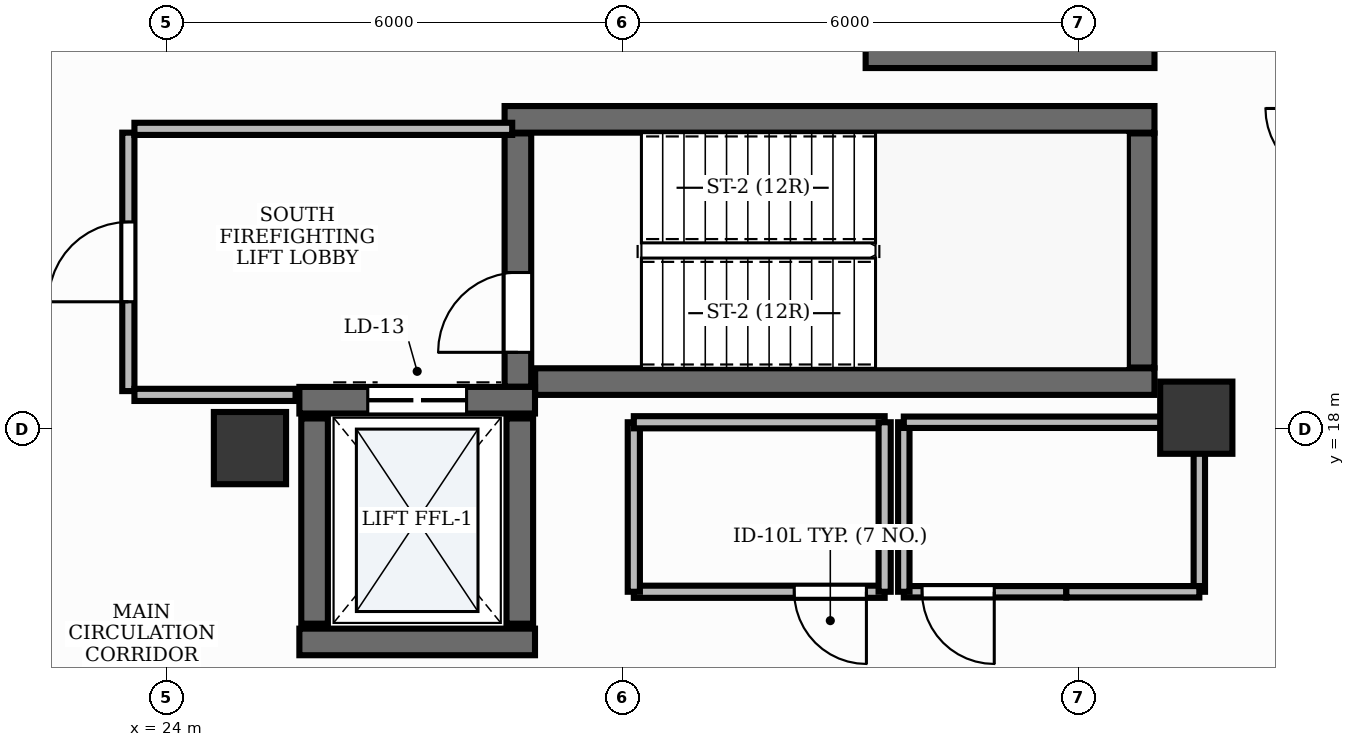
"""IFC4 building model, lengths in metres.
Left out: names, types, materials, properties, quantities, classifications, styles, units other than length and angle.
Written with IfcOpenShell. Run it as: python <this file> out.ifc"""

import sys

from ifc_helpers import new_model, si_unit, direction, frame, frame_2d, origin, origin_2d, place, context, subcontext, project, spatial, rectangle, extrude, element, fill, save


model = new_model("IFC4")
c1 = context("Model", 3, precision=1e-05, world=origin(), true_north=direction((0.0, 1.0)))
c2 = subcontext(c1, "Body", "Model", "MODEL_VIEW")
j1 = project(units=[si_unit("LENGTHUNIT", "METRE"), si_unit("PLANEANGLEUNIT", "RADIAN")], contexts=[c1])
p1 = place(None, origin())
s1 = spatial("IfcSite", under=j1, at=p1, CompositionType="ELEMENT")
p2 = place(p1, origin())
s2 = spatial("IfcBuilding", under=s1, at=p2, CompositionType="ELEMENT")
p3 = place(p2, frame((0.0, 0.0, 286.8)))
s3 = spatial("IfcBuildingStorey", under=s2, at=p3, CompositionType="ELEMENT", Elevation=286.8)
p4 = place(p3, frame((28.852, 18.625, 0.0), z_axis=(0.0, 0.0, 1.0), x_axis=(1.0, 0.0, 0.0)))
e1 = element("IfcWall", 1, at=p4, inside=s3, PredefinedType="SHEAR", context=c2, shape_type="SweptSolid", body=[
    extrude(rectangle(XDim=8.148, YDim=0.35, at=frame_2d((4.074, 0.0))), origin(), (0.0, 0.0, 1.0), 3.9),
])
p5 = place(p3, frame((28.45, 22.075, 0.0), z_axis=(0.0, 0.0, 1.0), x_axis=(1.0, 0.0, 0.0)))
e2 = element("IfcWall", 2, at=p5, inside=s3, PredefinedType="SHEAR", context=c2, shape_type="SweptSolid", body=[
    extrude(rectangle(XDim=8.55, YDim=0.35, at=frame_2d((4.275, 0.0))), origin(), (0.0, 0.0, 1.0), 3.9),
])
p6 = place(p3, frame((36.825, 18.81, 0.0), z_axis=(0.0, 0.0, 1.0), x_axis=(0.0, 1.0, 0.0)))
e3 = element("IfcWall", 3, at=p6, inside=s3, PredefinedType="SHEAR", context=c2, shape_type="SweptSolid", body=[
    extrude(rectangle(XDim=3.08, YDim=0.35, at=frame_2d((1.54, 0.0))), origin(), (0.0, 0.0, 1.0), 3.9),
])
p7 = place(p3, frame((28.625, 18.557, 0.0), z_axis=(0.0, 0.0, 1.0), x_axis=(0.0, 1.0, 0.0)))
e4 = element("IfcWall", 4, at=p7, inside=s3, PredefinedType="SHEAR", context=c2, shape_type="SweptSolid", body=[
    extrude(rectangle(XDim=3.333, YDim=0.35, at=frame_2d((1.667, 0.0))), origin(), (0.0, 0.0, 1.0), 3.9),
])
p8 = place(p7, frame((0.453, 0.0, 0.0)))
e5 = element("IfcOpeningElement", 5, at=p8, cuts=e4, PredefinedType="OPENING", context=c2, shape_type="SweptSolid", body=[
    extrude(rectangle(XDim=1.05, YDim=2.15, at=frame_2d((0.525, 1.075))), frame((0.0, 0.19, 0.0), z_axis=(0.0, -1.0, 0.0), x_axis=(1.0, 0.0, 0.0)), (0.0, 0.0, 1.0), 0.38),
])
p9 = place(p3, frame((33.2, 22.925, 0.0), z_axis=(0.0, 0.0, 1.0), x_axis=(1.0, 0.0, 0.0)))
e6 = element("IfcWall", 6, at=p9, inside=s3, PredefinedType="SHEAR", context=c2, shape_type="SweptSolid", body=[
    extrude(rectangle(XDim=3.8, YDim=0.35, at=frame_2d((1.9, 0.0))), origin(), (0.0, 0.0, 1.0), 3.9),
])
p10 = place(p3, frame((25.75, 15.2, 0.0), z_axis=(0.0, 0.0, 1.0), x_axis=(1.0, 0.0, 0.0)))
e7 = element("IfcWall", 7, at=p10, inside=s3, PredefinedType="SHEAR", context=c2, shape_type="SweptSolid", body=[
    extrude(rectangle(XDim=3.1, YDim=0.35, at=frame_2d((1.55, 0.0))), origin(), (0.0, 0.0, 1.0), 3.9),
])
p11 = place(p3, frame((25.75, 18.38, 0.0), z_axis=(0.0, 0.0, 1.0), x_axis=(1.0, 0.0, 0.0)))
e8 = element("IfcWall", 8, at=p11, inside=s3, PredefinedType="SHEAR", context=c2, shape_type="SweptSolid", body=[
    extrude(rectangle(XDim=3.1, YDim=0.35, at=frame_2d((1.55, 0.0))), origin(), (0.0, 0.0, 1.0), 3.9),
])
p12 = place(p11, frame((0.9, 0.0, 0.0)))
e9 = element("IfcOpeningElement", 9, at=p12, cuts=e8, PredefinedType="OPENING", context=c2, shape_type="SweptSolid", body=[
    extrude(rectangle(XDim=1.3, YDim=2.2, at=frame_2d((0.65, 1.1))), frame((0.0, 0.19, 0.0), z_axis=(0.0, -1.0, 0.0), x_axis=(1.0, 0.0, 0.0)), (0.0, 0.0, 1.0), 0.38),
])
for number, where, z_axis, x_axis in (
    (10, (25.95, 15.44, 0.0), (0.0, 0.0, 1.0), (0.0, 1.0, 0.0)),
    (11, (28.65, 15.44, 0.0), (0.0, 0.0, 1.0), (0.0, 1.0, 0.0)),
):
    element("IfcWall", number, at=place(p3, frame(where, z_axis=z_axis, x_axis=x_axis)), inside=s3, PredefinedType="SHEAR", context=c2, shape_type="SweptSolid", body=[
        extrude(rectangle(XDim=2.7, YDim=0.35, at=frame_2d((1.35, 0.0))), origin(), (0.0, 0.0, 1.0), 3.9),
    ])
for number, where, z_axis, x_axis in (
    (12, (25.1, 17.75, -0.0), (0.0, 0.0, 1.0), (1.0, 0.0, 0.0)),
    (13, (37.55, 18.15, -0.0), (0.0, 0.0, 1.0), (1.0, 0.0, 0.0)),
):
    element("IfcColumn", number, at=place(p3, frame(where, z_axis=z_axis, x_axis=x_axis)), inside=s3, PredefinedType="PILASTER", context=c2, shape_type="SweptSolid", body=[
        extrude(rectangle(XDim=0.95, YDim=0.95, at=origin_2d()), origin(), (0.0, 0.0, 1.0), 3.901),
    ])
p13 = place(p3, frame((23.5, 18.5, 0.0), z_axis=(0.0, 0.0, 1.0), x_axis=(0.0, 1.0, 0.0)))
e14 = element("IfcWall", 14, at=p13, inside=s3, PredefinedType="PARTITIONING", context=c2, shape_type="SweptSolid", body=[
    extrude(rectangle(XDim=3.4, YDim=0.16, at=frame_2d((1.7, 0.0))), origin(), (0.0, 0.0, 1.0), 2.22),
])
p14 = place(p13, frame((1.175, 0.0, 0.0)))
e15 = element("IfcOpeningElement", 15, at=p14, cuts=e14, PredefinedType="OPENING", context=c2, shape_type="SweptSolid", body=[
    extrude(rectangle(XDim=1.05, YDim=2.15, at=frame_2d((0.525, 1.075))), frame((0.0, 0.095, 0.0), z_axis=(0.0, -1.0, 0.0), x_axis=(1.0, 0.0, 0.0)), (0.0, 0.0, 1.0), 0.19),
])
p15 = place(p3, frame((23.58, 21.95, 0.0), z_axis=(0.0, 0.0, 1.0), x_axis=(1.0, 0.0, 0.0)))
e16 = element("IfcWall", 16, at=p15, inside=s3, PredefinedType="PARTITIONING", context=c2, shape_type="SweptSolid", body=[
    extrude(rectangle(XDim=4.97, YDim=0.16, at=frame_2d((2.485, 0.0))), origin(), (0.0, 0.0, 1.0), 2.22),
])
p16 = place(p3, frame((23.58, 18.45, 0.0), z_axis=(0.0, 0.0, 1.0), x_axis=(1.0, 0.0, 0.0)))
e17 = element("IfcWall", 17, at=p16, inside=s3, PredefinedType="PARTITIONING", context=c2, shape_type="SweptSolid", body=[
    extrude(rectangle(XDim=2.12, YDim=0.16, at=frame_2d((1.06, 0.0))), origin(), (0.0, 0.0, 1.0), 2.22),
])
p17 = place(p3, frame((33.45, 15.86, 0.0), z_axis=(0.0, 0.0, 1.0), x_axis=(-1.0, 0.0, 0.0)))
e18 = element("IfcWall", 18, at=p17, inside=s3, PredefinedType="PARTITIONING", context=c2, shape_type="SweptSolid", body=[
    extrude(rectangle(XDim=3.3, YDim=0.16, at=frame_2d((1.65, 0.0))), origin(), (0.0, 0.0, 1.0), 2.22),
])
p18 = place(p17, frame((0.24, 0.0, 0.0)))
e19 = element("IfcOpeningElement", 19, at=p18, cuts=e18, PredefinedType="OPENING", context=c2, shape_type="SweptSolid", body=[
    extrude(rectangle(XDim=0.95, YDim=2.15, at=frame_2d((0.475, 1.075))), frame((0.0, 0.095, 0.0), z_axis=(0.0, -1.0, 0.0), x_axis=(1.0, 0.0, 0.0)), (0.0, 0.0, 1.0), 0.19),
])
p19 = place(p3, frame((35.84, 15.86, 0.0), z_axis=(0.0, 0.0, 1.0), x_axis=(-1.0, 0.0, 0.0)))
e20 = element("IfcWall", 20, at=p19, inside=s3, PredefinedType="PARTITIONING", context=c2, shape_type="SweptSolid", body=[
    extrude(rectangle(XDim=2.138, YDim=0.15, at=frame_2d((1.069, 0.0))), origin(), (0.0, 0.0, 1.0), 2.22),
])
p20 = place(p19, frame((0.948, 0.0, 0.0)))
e21 = element("IfcOpeningElement", 21, at=p20, cuts=e20, PredefinedType="OPENING", context=c2, shape_type="SweptSolid", body=[
    extrude(rectangle(XDim=0.95, YDim=2.15, at=frame_2d((0.475, 1.075))), frame((0.0, 0.09, 0.0), z_axis=(0.0, -1.0, 0.0), x_axis=(1.0, 0.0, 0.0)), (0.0, 0.0, 1.0), 0.18),
])
p21 = place(p3, frame((30.15, 15.86, 0.0), z_axis=(0.0, 0.0, 1.0), x_axis=(0.0, 1.0, 0.0)))
e22 = element("IfcWall", 22, at=p21, inside=s3, PredefinedType="PARTITIONING", context=c2, shape_type="SweptSolid", body=[
    extrude(rectangle(XDim=2.23, YDim=0.16, at=frame_2d((1.115, 0.0))), origin(), (0.0, 0.0, 1.0), 2.22),
])
p22 = place(p3, frame((30.15, 18.09, 0.0), z_axis=(0.0, 0.0, 1.0), x_axis=(1.0, 0.0, 0.0)))
e23 = element("IfcWall", 23, at=p22, inside=s3, PredefinedType="PARTITIONING", context=c2, shape_type="SweptSolid", body=[
    extrude(rectangle(XDim=3.3, YDim=0.16, at=frame_2d((1.65, 0.0))), origin(), (0.0, 0.0, 1.0), 2.22),
])
p23 = place(p3, frame((33.45, 18.09, 0.0), z_axis=(0.0, 0.0, 1.0), x_axis=(0.0, -1.0, 0.0)))
e24 = element("IfcWall", 24, at=p23, inside=s3, PredefinedType="PARTITIONING", context=c2, shape_type="SweptSolid", body=[
    extrude(rectangle(XDim=2.23, YDim=0.16, at=frame_2d((1.115, 0.0))), origin(), (0.0, 0.0, 1.0), 2.22),
])
p24 = place(p3, frame((37.59, 18.058, 0.0), z_axis=(0.0, 0.0, 1.0), x_axis=(0.0, -1.0, 0.0)))
e25 = element("IfcWall", 25, at=p24, inside=s3, PredefinedType="PARTITIONING", context=c2, shape_type="SweptSolid", body=[
    extrude(rectangle(XDim=2.198, YDim=0.15, at=frame_2d((1.099, 0.0))), origin(), (0.0, 0.0, 1.0), 2.22),
])
p25 = place(p3, frame((37.59, 15.86, 0.0), z_axis=(0.0, 0.0, 1.0), x_axis=(-1.0, 0.0, 0.0)))
e26 = element("IfcWall", 26, at=p25, inside=s3, PredefinedType="PARTITIONING", context=c2, shape_type="SweptSolid", body=[
    extrude(rectangle(XDim=1.75, YDim=0.15, at=frame_2d((0.875, 0.0))), origin(), (0.0, 0.0, 1.0), 2.22),
])
p26 = place(p3, frame((33.702, 15.86, 0.0), z_axis=(0.0, 0.0, 1.0), x_axis=(0.0, 1.0, 0.0)))
e27 = element("IfcWall", 27, at=p26, inside=s3, PredefinedType="PARTITIONING", context=c2, shape_type="SweptSolid", body=[
    extrude(rectangle(XDim=2.23, YDim=0.15, at=frame_2d((1.115, 0.0))), origin(), (0.0, 0.0, 1.0), 2.22),
])
p27 = place(p3, frame((33.702, 18.09, 0.0), z_axis=(0.0, 0.0, 1.0), x_axis=(1.0, 0.0, 0.0)))
e28 = element("IfcWall", 28, at=p27, inside=s3, PredefinedType="PARTITIONING", context=c2, shape_type="SweptSolid", body=[
    extrude(rectangle(XDim=3.648, YDim=0.15, at=frame_2d((1.824, 0.0))), origin(), (0.0, 0.0, 1.0), 2.22),
])
p28 = place(p3, frame((37.36, 18.1, 0.0), z_axis=(0.0, 0.0, 1.0), x_axis=(0.0, 1.0, 0.0)))
e29 = element("IfcWall", 29, at=p28, inside=s3, PredefinedType="PARTITIONING", context=c2, shape_type="SweptSolid", body=[
    extrude(rectangle(XDim=0.126, YDim=0.15, at=frame_2d((0.063, 0.0))), origin(), (0.0, 0.0, 1.0), 2.22),
])
p29 = place(p3, frame((37.36, 18.353, 0.0), z_axis=(0.0, 0.0, 1.0), x_axis=(0.61525105599, -0.788331236285, 0.0)))
e30 = element("IfcWall", 30, at=p29, inside=s3, PredefinedType="PARTITIONING", context=c2, shape_type="SweptSolid", body=[
    extrude(rectangle(XDim=0.374, YDim=0.15, at=frame_2d((0.187, 0.0))), origin(), (0.0, 0.0, 1.0), 2.22),
])
p30 = place(p8, origin())
e31 = element("IfcDoor", 31, at=p30, inside=s3, OperationType="SINGLE_SWING_LEFT", PredefinedType="DOOR", context=c2, shape_type="SweptSolid", body=[
    extrude(rectangle(XDim=1.05, YDim=2.15, at=frame_2d((0.525, 1.075))), frame((0.0, 0.025, 0.0), z_axis=(0.0, -1.0, 0.0), x_axis=(1.0, 0.0, 0.0)), (0.0, 0.0, 1.0), 0.05),
])
fill(e5, e31)
p31 = place(p12, origin())
e32 = element("IfcDoor", 32, at=p31, inside=s3, OperationType="DOUBLE_DOOR_SLIDING", PredefinedType="DOOR", context=c2, shape_type="SweptSolid", body=[
    extrude(rectangle(XDim=1.3, YDim=2.2, at=frame_2d((0.65, 1.1))), frame((0.0, 0.025, 0.0), z_axis=(0.0, -1.0, 0.0), x_axis=(1.0, 0.0, 0.0)), (0.0, 0.0, 1.0), 0.05),
])
fill(e9, e32)
p32 = place(p14, origin())
e33 = element("IfcDoor", 33, at=p32, inside=s3, OperationType="SINGLE_SWING_LEFT", PredefinedType="DOOR", context=c2, shape_type="SweptSolid", body=[
    extrude(rectangle(XDim=1.05, YDim=2.15, at=frame_2d((0.525, 1.075))), frame((0.0, 0.025, 0.0), z_axis=(0.0, -1.0, 0.0), x_axis=(1.0, 0.0, 0.0)), (0.0, 0.0, 1.0), 0.05),
])
fill(e15, e33)
p33 = place(p18, origin())
e34 = element("IfcDoor", 34, at=p33, inside=s3, OperationType="SINGLE_SWING_LEFT", PredefinedType="DOOR", context=c2, shape_type="SweptSolid", body=[
    extrude(rectangle(XDim=0.95, YDim=2.15, at=frame_2d((0.475, 1.075))), frame((0.0, 0.025, 0.0), z_axis=(0.0, -1.0, 0.0), x_axis=(1.0, 0.0, 0.0)), (0.0, 0.0, 1.0), 0.05),
])
fill(e19, e34)
p34 = place(p20, origin())
e35 = element("IfcDoor", 35, at=p34, inside=s3, OperationType="SINGLE_SWING_LEFT", PredefinedType="DOOR", context=c2, shape_type="SweptSolid", body=[
    extrude(rectangle(XDim=0.95, YDim=2.15, at=frame_2d((0.475, 1.075))), frame((0.0, 0.025, 0.0), z_axis=(0.0, -1.0, 0.0), x_axis=(1.0, 0.0, 0.0)), (0.0, 0.0, 1.0), 0.05),
])
fill(e21, e35)
save(model, sys.argv[1])
